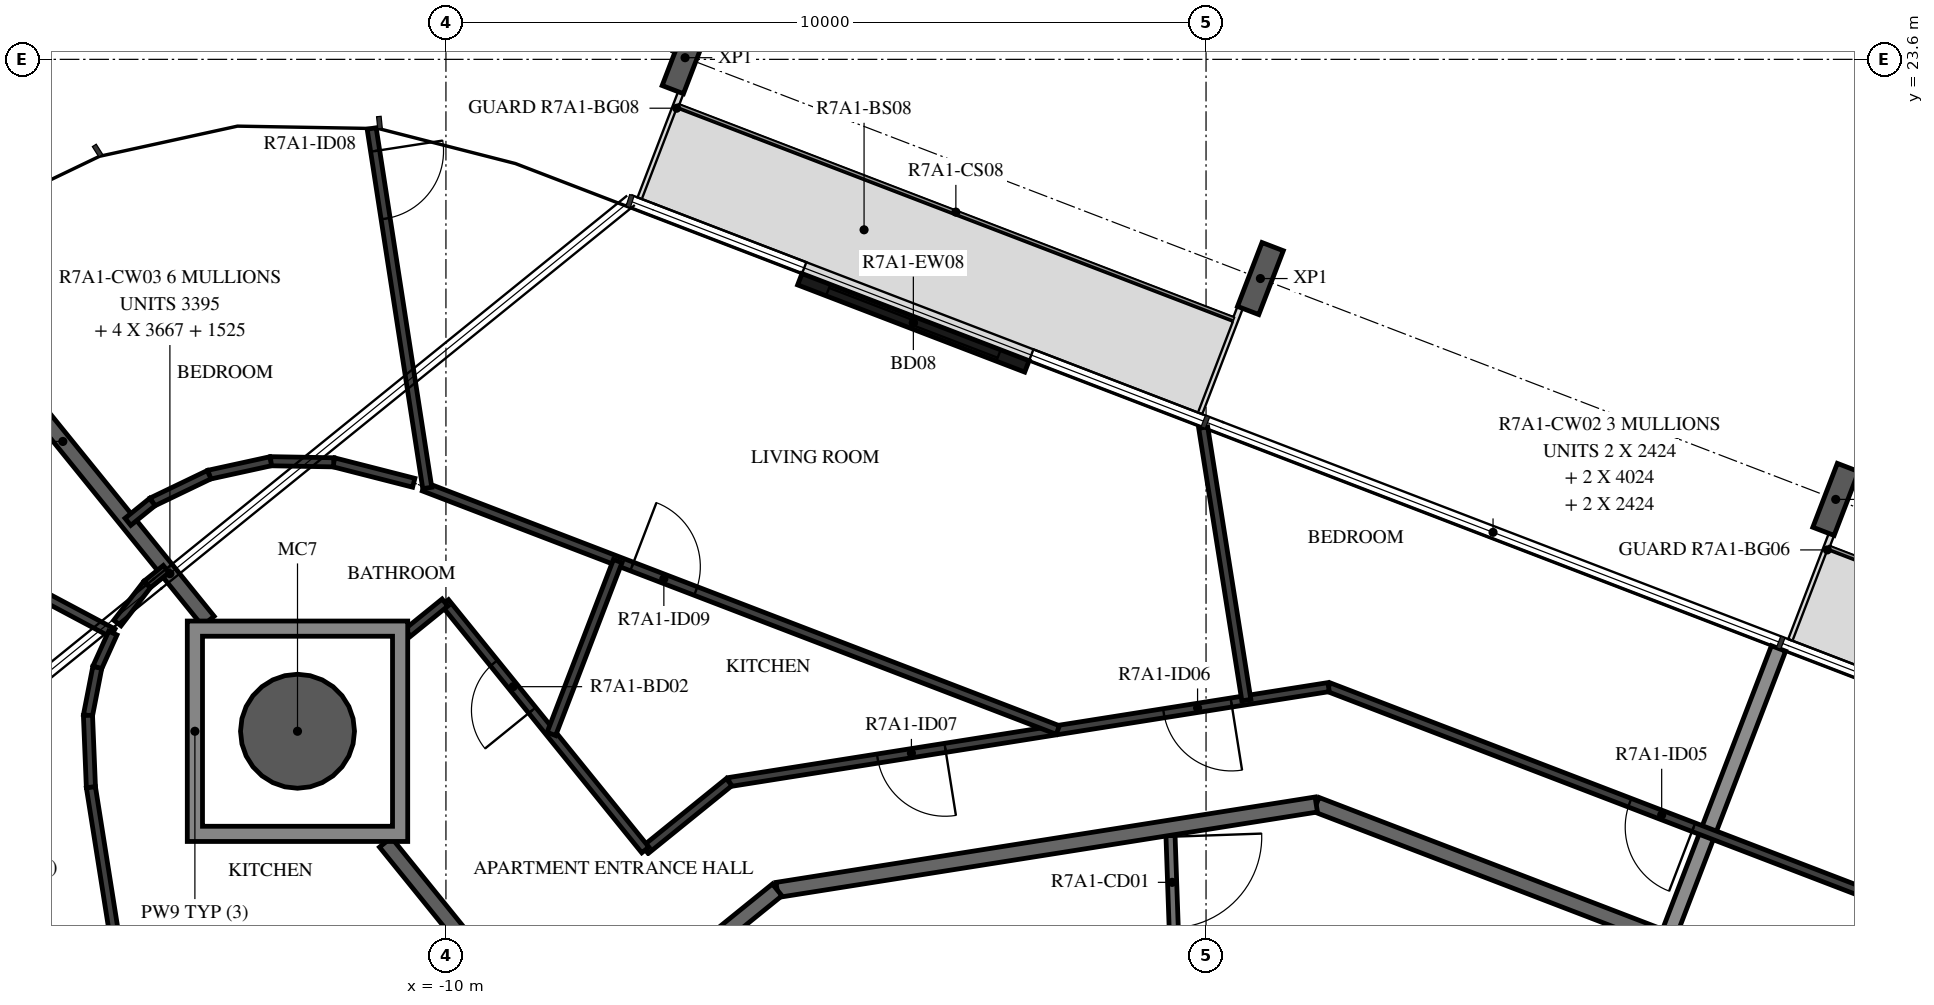
"""IFC4 building model, lengths in metres.
Left out: names, types, materials, properties, quantities, classifications, styles, units other than length and angle.
Written with IfcOpenShell. Run it as: python <this file> out.ifc"""

import sys

from ifc_helpers import new_model, si_unit, direction, frame, frame_2d, origin, origin_2d, place, context, subcontext, project, spatial, polyline, rectangle, hollow_circle, i_section, outline, extrude, element, fill, save


model = new_model("IFC4")
c1 = context("Model", 3, precision=1e-05, world=origin(), true_north=direction((0.0, 1.0)))
c2 = subcontext(c1, "Body", "Model", "MODEL_VIEW")
j1 = project(units=[si_unit("LENGTHUNIT", "METRE"), si_unit("PLANEANGLEUNIT", "RADIAN")], contexts=[c1])
p1 = place(None, origin())
s1 = spatial("IfcSite", under=j1, at=p1, CompositionType="ELEMENT")
p2 = place(p1, origin())
s2 = spatial("IfcBuilding", under=s1, at=p2, CompositionType="ELEMENT")
p3 = place(p2, frame((0.0, 0.0, 266.9)))
s3 = spatial("IfcBuildingStorey", under=s2, at=p3, CompositionType="ELEMENT", Elevation=266.9)
p4 = place(p3, frame((-11.953, 14.76, -0.38), z_axis=(0.0, 0.0, 1.0), x_axis=(1.0, 0.0, 0.0)))
e1 = element("IfcColumn", 1, at=p4, inside=s3, PredefinedType="COLUMN", context=c2, shape_type="SweptSolid", body=[
    extrude(hollow_circle(Radius=0.75, WallThickness=0.035, at=origin_2d()), origin(), (0.0, 0.0, 1.0), 3.5),
])
for number, where, z_axis, x_axis in (
    (2, (8.284, 17.811, -0.38), (0.0, 0.0, 1.0), (0.934, -0.358, 0.0)),
    (3, (0.715, 20.716, -0.38), (0.0, 0.0, 1.0), (0.934, -0.358, 0.0)),
    (4, (-6.854, 23.622, -0.38), (0.0, 0.0, 1.0), (0.934, -0.358, 0.0)),
):
    element("IfcColumn", number, at=place(p3, frame(where, z_axis=z_axis, x_axis=x_axis)), inside=s3, PredefinedType="COLUMN", context=c2, shape_type="SweptSolid", body=[
        extrude(i_section(OverallWidth=0.3, OverallDepth=0.9, WebThickness=0.019, FlangeThickness=0.035, FilletRadius=0.03, at=origin_2d()), origin(), (0.0, 0.0, 1.0), 3.5),
    ])
p5 = place(p3, frame((-2.357, 19.56, 0.0), z_axis=(0.0, 0.0, 1.0), x_axis=(-0.933553885508, 0.358437083534, 0.0)))
e5 = element("IfcWall", 5, at=p5, inside=s3, PredefinedType="STANDARD", context=c2, shape_type="SweptSolid", body=[
    extrude(rectangle(XDim=3.2, YDim=0.16, at=frame_2d((1.6, 0.0))), origin(), (0.0, 0.0, 1.0), 3.12),
])
p6 = place(p5, frame((0.4, 0.0, 0.0)))
e6 = element("IfcOpeningElement", 6, at=p6, cuts=e5, PredefinedType="OPENING", context=c2, shape_type="SweptSolid", body=[
    extrude(rectangle(XDim=2.4, YDim=2.4, at=frame_2d((1.2, 1.2))), frame((0.0, 0.09, 0.0), z_axis=(0.0, -1.0, 0.0), x_axis=(1.0, 0.0, 0.0)), (0.0, 0.0, 1.0), 0.18),
])
p7 = place(p3, frame((-0.471, 13.492, 0.0), z_axis=(0.0, 0.0, 1.0), x_axis=(0.034873173869, -0.999391745886, 0.0)))
e7 = element("IfcWall", 7, at=p7, inside=s3, PredefinedType="PARTITIONING", context=c2, shape_type="SweptSolid", body=[
    extrude(rectangle(XDim=1.596, YDim=0.12, at=frame_2d((0.798, 0.0))), origin(), (0.0, 0.0, 1.0), 3.12),
])
p8 = place(p7, frame((0.12, 0.0, 0.0)))
e8 = element("IfcOpeningElement", 8, at=p8, cuts=e7, PredefinedType="OPENING", context=c2, shape_type="SweptSolid", body=[
    extrude(rectangle(XDim=1.2, YDim=2.1, at=frame_2d((0.6, 1.05))), frame((0.0, 0.07, 0.0), z_axis=(0.0, -1.0, 0.0), x_axis=(1.0, 0.0, 0.0)), (0.0, 0.0, 1.0), 0.14),
])
p9 = place(p3, frame((8.154, 11.223, 0.0), z_axis=(0.0, 0.0, 1.0), x_axis=(-0.93359073609, 0.358341090983, 0.0)))
e9 = element("IfcWall", 9, at=p9, inside=s3, PredefinedType="STANDARD", context=c2, shape_type="SweptSolid", body=[
    extrude(rectangle(XDim=7.181, YDim=0.2, at=frame_2d((3.59, 0.0))), origin(), (0.0, 0.0, 1.0), 3.12),
])
p10 = place(p3, frame((1.45, 13.797, 0.0), z_axis=(0.0, 0.0, 1.0), x_axis=(-0.987690361611, -0.156421704315, 0.0)))
e10 = element("IfcWall", 10, at=p10, inside=s3, PredefinedType="STANDARD", context=c2, shape_type="SweptSolid", body=[
    extrude(rectangle(XDim=7.181, YDim=0.2, at=frame_2d((3.591, 0.0))), origin(), (0.0, 0.0, 1.0), 3.12),
])
p11 = place(p3, frame((-5.643, 12.673, 0.0), z_axis=(0.0, 0.0, 1.0), x_axis=(-0.777160148113, -0.629302871585, 0.0)))
e11 = element("IfcWall", 11, at=p11, inside=s3, PredefinedType="STANDARD", context=c2, shape_type="SweptSolid", body=[
    extrude(rectangle(XDim=7.181, YDim=0.2, at=frame_2d((3.59, 0.0))), origin(), (0.0, 0.0, 1.0), 3.12),
])
p12 = place(p11, frame((2.41, 0.0, 0.0)))
e12 = element("IfcOpeningElement", 12, at=p12, cuts=e11, PredefinedType="OPENING", context=c2, shape_type="SweptSolid", body=[
    extrude(rectangle(XDim=1.0, YDim=2.1, at=frame_2d((0.5, 1.05))), frame((0.0, 0.11, 0.0), z_axis=(0.0, -1.0, 0.0), x_axis=(1.0, 0.0, 0.0)), (0.0, 0.0, 1.0), 0.22),
])
p13 = place(p11, frame((5.112, 0.0, 0.0)))
e13 = element("IfcOpeningElement", 13, at=p13, cuts=e11, PredefinedType="OPENING", context=c2, shape_type="SweptSolid", body=[
    extrude(rectangle(XDim=1.0, YDim=2.1, at=frame_2d((0.5, 1.05))), frame((0.0, 0.11, 0.0), z_axis=(0.0, -1.0, 0.0), x_axis=(1.0, 0.0, 0.0)), (0.0, 0.0, 1.0), 0.22),
])
p14 = place(p3, frame((7.532, 15.85, 0.0), z_axis=(0.0, 0.0, 1.0), x_axis=(-0.358355996975, -0.933585014571, 0.0)))
e14 = element("IfcWall", 14, at=p14, inside=s3, PredefinedType="STANDARD", context=c2, shape_type="SweptSolid", body=[
    extrude(rectangle(XDim=4.096, YDim=0.2, at=frame_2d((2.048, 0.0))), origin(), (0.0, 0.0, 1.0), 2.73),
])
p15 = place(p3, frame((-10.796, 13.299, 0.0), z_axis=(0.0, 0.0, 1.0), x_axis=(0.629290499381, -0.777170166301, 0.0)))
e15 = element("IfcWall", 15, at=p15, inside=s3, PredefinedType="STANDARD", context=c2, shape_type="SweptSolid", body=[
    extrude(rectangle(XDim=3.729, YDim=0.2, at=frame_2d((1.865, 0.0))), origin(), (0.0, 0.0, 1.0), 3.12),
])
p16 = place(p3, frame((-16.953, 20.936, 0.0), z_axis=(0.0, 0.0, 1.0), x_axis=(0.629331057166, -0.777137324085, 0.0)))
e16 = element("IfcWall", 16, at=p16, inside=s3, PredefinedType="STANDARD", context=c2, shape_type="SweptSolid", body=[
    extrude(rectangle(XDim=6.08, YDim=0.2, at=frame_2d((3.04, 0.0))), origin(), (0.0, 0.0, 1.0), 3.12),
])
p17 = place(p3, frame((9.067, 12.479, 0.0), z_axis=(0.0, 0.0, 1.0), x_axis=(-0.933579449035, 0.358370495911, 0.0)))
e17 = element("IfcWall", 17, at=p17, inside=s3, PredefinedType="PARTITIONING", context=c2, shape_type="SweptSolid", body=[
    extrude(rectangle(XDim=7.985, YDim=0.12, at=frame_2d((3.992, 0.0))), origin(), (0.0, 0.0, 1.0), 3.12),
])
p18 = place(p17, frame((2.841, 0.0, 0.0)))
e18 = element("IfcOpeningElement", 18, at=p18, cuts=e17, PredefinedType="OPENING", context=c2, shape_type="SweptSolid", body=[
    extrude(rectangle(XDim=0.9, YDim=2.1, at=frame_2d((0.45, 1.05))), frame((0.0, 0.07, 0.0), z_axis=(0.0, -1.0, 0.0), x_axis=(1.0, 0.0, 0.0)), (0.0, 0.0, 1.0), 0.14),
])
p19 = place(p3, frame((1.612, 15.341, 0.0), z_axis=(0.0, 0.0, 1.0), x_axis=(-0.987689722749, -0.156425738216, 0.0)))
e19 = element("IfcWall", 19, at=p19, inside=s3, PredefinedType="PARTITIONING", context=c2, shape_type="SweptSolid", body=[
    extrude(rectangle(XDim=7.985, YDim=0.12, at=frame_2d((3.992, 0.0))), origin(), (0.0, 0.0, 1.0), 3.12),
])
p20 = place(p19, frame((1.295, 0.0, 0.0)))
e20 = element("IfcOpeningElement", 20, at=p20, cuts=e19, PredefinedType="OPENING", context=c2, shape_type="SweptSolid", body=[
    extrude(rectangle(XDim=0.9, YDim=2.1, at=frame_2d((0.45, 1.05))), frame((0.0, 0.07, 0.0), z_axis=(0.0, -1.0, 0.0), x_axis=(1.0, 0.0, 0.0)), (0.0, 0.0, 1.0), 0.14),
])
p21 = place(p19, frame((5.107, 0.0, 0.0)))
e21 = element("IfcOpeningElement", 21, at=p21, cuts=e19, PredefinedType="OPENING", context=c2, shape_type="SweptSolid", body=[
    extrude(rectangle(XDim=0.9, YDim=2.1, at=frame_2d((0.45, 1.05))), frame((0.0, 0.07, 0.0), z_axis=(0.0, -1.0, 0.0), x_axis=(1.0, 0.0, 0.0)), (0.0, 0.0, 1.0), 0.14),
])
p22 = place(p3, frame((-6.274, 14.092, 0.0), z_axis=(0.0, 0.0, 1.0), x_axis=(-0.777144673245, -0.629321981855, 0.0)))
e22 = element("IfcWall", 22, at=p22, inside=s3, PredefinedType="PARTITIONING", context=c2, shape_type="SweptSolid", body=[
    extrude(rectangle(XDim=1.419, YDim=0.12, at=frame_2d((0.709, 0.0))), origin(), (0.0, 0.0, 1.0), 3.12),
])
p23 = place(p3, frame((-7.377, 13.199, 0.0), z_axis=(0.0, 0.0, 1.0), x_axis=(-0.629382670352, 0.77709552454, 0.0)))
e23 = element("IfcWall", 23, at=p23, inside=s3, PredefinedType="PARTITIONING", context=c2, shape_type="SweptSolid", body=[
    extrude(rectangle(XDim=4.188, YDim=0.12, at=frame_2d((2.094, 0.0))), origin(), (0.0, 0.0, 1.0), 3.12),
])
p24 = place(p23, frame((2.364, 0.0, 0.0)))
e24 = element("IfcOpeningElement", 24, at=p24, cuts=e23, PredefinedType="OPENING", context=c2, shape_type="SweptSolid", body=[
    extrude(rectangle(XDim=0.8, YDim=2.1, at=frame_2d((0.4, 1.05))), frame((0.0, 0.07, 0.0), z_axis=(0.0, -1.0, 0.0), x_axis=(1.0, 0.0, 0.0)), (0.0, 0.0, 1.0), 0.14),
])
p25 = place(p3, frame((-10.013, 16.454, 0.0), z_axis=(0.0, 0.0, 1.0), x_axis=(-0.777001388062, -0.629498882406, 0.0)))
e25 = element("IfcWall", 25, at=p25, inside=s3, PredefinedType="PARTITIONING", context=c2, shape_type="SweptSolid", body=[
    extrude(rectangle(XDim=0.631, YDim=0.12, at=frame_2d((0.315, 0.0))), origin(), (0.0, 0.0, 1.0), 3.12),
])
p26 = place(p3, frame((-0.037, 18.756, 0.0), z_axis=(0.0, 0.0, 1.0), x_axis=(0.156421851095, -0.987690338365, 0.0)))
e26 = element("IfcWall", 26, at=p26, inside=s3, PredefinedType="PARTITIONING", context=c2, shape_type="SweptSolid", body=[
    extrude(rectangle(XDim=3.63, YDim=0.12, at=frame_2d((1.815, 0.0))), origin(), (0.0, 0.0, 1.0), 3.12),
])
p27 = place(p3, frame((-10.289, 17.978, 0.0), z_axis=(0.0, 0.0, 1.0), x_axis=(0.933579293595, -0.358370900844, 0.0)))
e27 = element("IfcWall", 27, at=p27, inside=s3, PredefinedType="PARTITIONING", context=c2, shape_type="SweptSolid", body=[
    extrude(rectangle(XDim=8.932, YDim=0.12, at=frame_2d((4.466, 0.0))), origin(), (0.0, 0.0, 1.0), 3.12),
])
p28 = place(p27, frame((2.93, 0.0, 0.0)))
e28 = element("IfcOpeningElement", 28, at=p28, cuts=e27, PredefinedType="OPENING", context=c2, shape_type="SweptSolid", body=[
    extrude(rectangle(XDim=0.9, YDim=2.1, at=frame_2d((0.45, 1.05))), frame((0.0, 0.07, 0.0), z_axis=(0.0, -1.0, 0.0), x_axis=(1.0, 0.0, 0.0)), (0.0, 0.0, 1.0), 0.14),
])
p29 = place(p3, frame((-10.977, 22.691, 0.0), z_axis=(0.0, 0.0, 1.0), x_axis=(0.152888983102, -0.988243370252, 0.0)))
e29 = element("IfcWall", 29, at=p29, inside=s3, PredefinedType="PARTITIONING", context=c2, shape_type="SweptSolid", body=[
    extrude(rectangle(XDim=4.786, YDim=0.12, at=frame_2d((2.393, 0.0))), origin(), (0.0, 0.0, 1.0), 3.12),
])
p30 = place(p29, frame((0.3, 0.0, 0.0)))
e30 = element("IfcOpeningElement", 30, at=p30, cuts=e29, PredefinedType="OPENING", context=c2, shape_type="SweptSolid", body=[
    extrude(rectangle(XDim=0.9, YDim=2.1, at=frame_2d((0.45, 1.05))), frame((0.0, 0.07, 0.0), z_axis=(0.0, -1.0, 0.0), x_axis=(1.0, 0.0, 0.0)), (0.0, 0.0, 1.0), 0.14),
])
p31 = place(p3, frame((-7.74, 17.0, 0.0), z_axis=(0.0, 0.0, 1.0), x_axis=(-0.358394723652, -0.93357014844, 0.0)))
e31 = element("IfcWall", 31, at=p31, inside=s3, PredefinedType="PARTITIONING", context=c2, shape_type="SweptSolid", body=[
    extrude(rectangle(XDim=2.436, YDim=0.12, at=frame_2d((1.218, 0.0))), origin(), (0.0, 0.0, 1.0), 3.12),
])
p32 = place(p3, frame((-10.424, 18.03, 0.0), z_axis=(0.0, 0.0, 1.0), x_axis=(-0.968874161395, 0.247553750489, 0.0)))
e32 = element("IfcWall", 32, at=p32, inside=s3, PredefinedType="PARTITIONING", context=c2, shape_type="SweptSolid", body=[
    extrude(rectangle(XDim=1.087, YDim=0.12, at=frame_2d((0.543, 0.0))), origin(), (0.0, 0.0, 1.0), 3.12),
])
p33 = place(p3, frame((-11.477, 18.299, 0.0), z_axis=(0.0, 0.0, 1.0), x_axis=(-0.999848939146, 0.017380992165, 0.0)))
e33 = element("IfcWall", 33, at=p33, inside=s3, PredefinedType="PARTITIONING", context=c2, shape_type="SweptSolid", body=[
    extrude(rectangle(XDim=0.829, YDim=0.12, at=frame_2d((0.415, 0.0))), origin(), (0.0, 0.0, 1.0), 3.12),
])
p34 = place(p3, frame((-12.305, 18.313, 0.0), z_axis=(0.0, 0.0, 1.0), x_axis=(-0.976949932909, -0.21346856581, 0.0)))
e34 = element("IfcWall", 34, at=p34, inside=s3, PredefinedType="PARTITIONING", context=c2, shape_type="SweptSolid", body=[
    extrude(rectangle(XDim=0.829, YDim=0.12, at=frame_2d((0.415, 0.0))), origin(), (0.0, 0.0, 1.0), 3.12),
])
p35 = place(p3, frame((-13.115, 18.136, 0.0), z_axis=(0.0, 0.0, 1.0), x_axis=(-0.901385111422, -0.43301833784, 0.0)))
e35 = element("IfcWall", 35, at=p35, inside=s3, PredefinedType="PARTITIONING", context=c2, shape_type="SweptSolid", body=[
    extrude(rectangle(XDim=0.829, YDim=0.12, at=frame_2d((0.415, 0.0))), origin(), (0.0, 0.0, 1.0), 3.12),
])
p36 = place(p3, frame((-13.862, 17.777, 0.0), z_axis=(0.0, 0.0, 1.0), x_axis=(-0.776888119785, -0.629638665694, 0.0)))
e36 = element("IfcWall", 36, at=p36, inside=s3, PredefinedType="PARTITIONING", context=c2, shape_type="SweptSolid", body=[
    extrude(rectangle(XDim=0.415, YDim=0.12, at=frame_2d((0.207, 0.0))), origin(), (0.0, 0.0, 1.0), 3.12),
])
p37 = place(p3, frame((-14.323, 16.184, 0.0), z_axis=(0.0, 0.0, 1.0), x_axis=(0.611198506308, 0.791477343887, 0.0)))
e37 = element("IfcWall", 37, at=p37, inside=s3, PredefinedType="PARTITIONING", context=c2, shape_type="SweptSolid", body=[
    extrude(rectangle(XDim=0.642, YDim=0.12, at=frame_2d((0.321, 0.0))), origin(), (0.0, 0.0, 1.0), 3.12),
])
p38 = place(p3, frame((-13.93, 16.692, 0.0), z_axis=(0.0, 0.0, 1.0), x_axis=(0.776695397137, 0.62987638475, 0.0)))
e38 = element("IfcWall", 38, at=p38, inside=s3, PredefinedType="PARTITIONING", context=c2, shape_type="SweptSolid", body=[
    extrude(rectangle(XDim=0.321, YDim=0.12, at=frame_2d((0.161, 0.0))), origin(), (0.0, 0.0, 1.0), 3.12),
])
p39 = place(p3, frame((-18.983, 18.499, 0.0), z_axis=(0.0, 0.0, 1.0), x_axis=(0.882948840489, -0.469469216328, 0.0)))
e39 = element("IfcWall", 39, at=p39, inside=s3, PredefinedType="PARTITIONING", context=c2, shape_type="SweptSolid", body=[
    extrude(rectangle(XDim=5.211, YDim=0.12, at=frame_2d((2.605, 0.0))), origin(), (0.0, 0.0, 1.0), 2.73),
])
p40 = place(p39, frame((0.2, 0.0, 0.0)))
e40 = element("IfcOpeningElement", 40, at=p40, cuts=e39, PredefinedType="OPENING", context=c2, shape_type="SweptSolid", body=[
    extrude(rectangle(XDim=0.8, YDim=2.1, at=frame_2d((0.4, 1.05))), frame((0.0, 0.07, 0.0), z_axis=(0.0, -1.0, 0.0), x_axis=(1.0, 0.0, 0.0)), (0.0, 0.0, 1.0), 0.14),
])
p41 = place(p3, frame((-14.382, 16.052, 0.0), z_axis=(0.0, 0.0, 1.0), x_axis=(-0.412099912529, -0.911138662385, 0.0)))
e41 = element("IfcWall", 41, at=p41, inside=s3, PredefinedType="PARTITIONING", context=c2, shape_type="SweptSolid", body=[
    extrude(rectangle(XDim=0.497, YDim=0.12, at=frame_2d((0.249, 0.0))), origin(), (0.0, 0.0, 1.0), 3.12),
])
p42 = place(p3, frame((-14.587, 15.6, 0.0), z_axis=(0.0, 0.0, 1.0), x_axis=(-0.190920556667, -0.98160549155, 0.0)))
e42 = element("IfcWall", 42, at=p42, inside=s3, PredefinedType="PARTITIONING", context=c2, shape_type="SweptSolid", body=[
    extrude(rectangle(XDim=0.642, YDim=0.12, at=frame_2d((0.321, 0.0))), origin(), (0.0, 0.0, 1.0), 3.12),
])
p43 = place(p3, frame((-14.709, 14.969, 0.0), z_axis=(0.0, 0.0, 1.0), x_axis=(0.040729848009, -0.999170195453, 0.0)))
e43 = element("IfcWall", 43, at=p43, inside=s3, PredefinedType="PARTITIONING", context=c2, shape_type="SweptSolid", body=[
    extrude(rectangle(XDim=0.947, YDim=0.12, at=frame_2d((0.474, 0.0))), origin(), (0.0, 0.0, 1.0), 3.12),
])
p44 = place(p3, frame((-14.671, 14.023, 0.0), z_axis=(0.0, 0.0, 1.0), x_axis=(0.156438190471, -0.987687750538, 0.0)))
e44 = element("IfcWall", 44, at=p44, inside=s3, PredefinedType="PARTITIONING", context=c2, shape_type="SweptSolid", body=[
    extrude(rectangle(XDim=7.644, YDim=0.12, at=frame_2d((3.822, 0.0))), origin(), (0.0, 0.0, 1.0), 3.12),
])
p45 = place(p44, frame((3.803, 0.0, 0.0)))
e45 = element("IfcOpeningElement", 45, at=p45, cuts=e44, PredefinedType="OPENING", context=c2, shape_type="SweptSolid", body=[
    extrude(rectangle(XDim=0.9, YDim=2.1, at=frame_2d((0.45, 1.05))), frame((0.0, 0.07, 0.0), z_axis=(0.0, -1.0, 0.0), x_axis=(1.0, 0.0, 0.0)), (0.0, 0.0, 1.0), 0.14),
])
p46 = place(p3, frame((-19.913, 15.451, 0.0), z_axis=(0.0, 0.0, 1.0), x_axis=(0.758623462992, -0.6515293097, 0.0)))
e46 = element("IfcWall", 46, at=p46, inside=s3, PredefinedType="PARTITIONING", context=c2, shape_type="SweptSolid", body=[
    extrude(rectangle(XDim=7.653, YDim=0.12, at=frame_2d((3.826, 0.0))), origin(), (0.0, 0.0, 1.0), 3.12),
])
p47 = place(p46, frame((0.7, 0.0, 0.0)))
e47 = element("IfcOpeningElement", 47, at=p47, cuts=e46, PredefinedType="OPENING", context=c2, shape_type="SweptSolid", body=[
    extrude(rectangle(XDim=0.9, YDim=2.1, at=frame_2d((0.45, 1.05))), frame((0.0, 0.07, 0.0), z_axis=(0.0, -1.0, 0.0), x_axis=(1.0, 0.0, 0.0)), (0.0, 0.0, 1.0), 0.14),
])
p48 = place(p3, origin())
e48 = element("IfcWall", 48, at=p48, inside=s3, PredefinedType="STANDARD", context=c2, shape_type="SweptSolid", body=[
    extrude(outline(polyline([(-10.503, 16.21), (-10.503, 13.311), (-13.403, 13.311), (-13.403, 16.21), (-10.503, 16.21)]), holes=[polyline([(-13.203, 13.51), (-10.703, 13.51), (-10.703, 16.01), (-13.203, 16.01), (-13.203, 13.51)])]), origin(), (0.0, 0.0, 1.0), 3.12),
])
p49 = place(p6, origin())
e49 = element("IfcDoor", 49, at=p49, inside=s3, OperationType="DOUBLE_DOOR_SLIDING", PredefinedType="DOOR", context=c2, shape_type="SweptSolid", body=[
    extrude(rectangle(XDim=2.4, YDim=2.4, at=frame_2d((1.2, 1.2))), frame((0.0, 0.025, 0.0), z_axis=(0.0, -1.0, 0.0), x_axis=(1.0, 0.0, 0.0)), (0.0, 0.0, 1.0), 0.05),
])
fill(e6, e49)
p50 = place(p18, origin())
e50 = element("IfcDoor", 50, at=p50, inside=s3, OperationType="SINGLE_SWING_LEFT", PredefinedType="DOOR", context=c2, shape_type="SweptSolid", body=[
    extrude(rectangle(XDim=0.9, YDim=2.1, at=frame_2d((0.45, 1.05))), frame((0.0, 0.025, 0.0), z_axis=(0.0, -1.0, 0.0), x_axis=(1.0, 0.0, 0.0)), (0.0, 0.0, 1.0), 0.05),
])
fill(e18, e50)
p51 = place(p20, origin())
e51 = element("IfcDoor", 51, at=p51, inside=s3, OperationType="SINGLE_SWING_RIGHT", PredefinedType="DOOR", context=c2, shape_type="SweptSolid", body=[
    extrude(rectangle(XDim=0.9, YDim=2.1, at=frame_2d((0.45, 1.05))), frame((0.0, 0.025, 0.0), z_axis=(0.0, -1.0, 0.0), x_axis=(1.0, 0.0, 0.0)), (0.0, 0.0, 1.0), 0.05),
])
fill(e20, e51)
p52 = place(p21, origin())
e52 = element("IfcDoor", 52, at=p52, inside=s3, OperationType="SINGLE_SWING_RIGHT", PredefinedType="DOOR", context=c2, shape_type="SweptSolid", body=[
    extrude(rectangle(XDim=0.9, YDim=2.1, at=frame_2d((0.45, 1.05))), frame((0.0, 0.025, 0.0), z_axis=(0.0, -1.0, 0.0), x_axis=(1.0, 0.0, 0.0)), (0.0, 0.0, 1.0), 0.05),
])
fill(e21, e52)
p53 = place(p24, origin())
e53 = element("IfcDoor", 53, at=p53, inside=s3, OperationType="SINGLE_SWING_RIGHT", PredefinedType="DOOR", context=c2, shape_type="SweptSolid", body=[
    extrude(rectangle(XDim=0.8, YDim=2.1, at=frame_2d((0.4, 1.05))), frame((0.0, 0.025, 0.0), z_axis=(0.0, -1.0, 0.0), x_axis=(1.0, 0.0, 0.0)), (0.0, 0.0, 1.0), 0.05),
])
fill(e24, e53)
p54 = place(p30, origin())
e54 = element("IfcDoor", 54, at=p54, inside=s3, OperationType="SINGLE_SWING_RIGHT", PredefinedType="DOOR", context=c2, shape_type="SweptSolid", body=[
    extrude(rectangle(XDim=0.9, YDim=2.1, at=frame_2d((0.45, 1.05))), frame((0.0, 0.025, 0.0), z_axis=(0.0, -1.0, 0.0), x_axis=(1.0, 0.0, 0.0)), (0.0, 0.0, 1.0), 0.05),
])
fill(e30, e54)
p55 = place(p28, origin())
e55 = element("IfcDoor", 55, at=p55, inside=s3, OperationType="SINGLE_SWING_LEFT", PredefinedType="DOOR", context=c2, shape_type="SweptSolid", body=[
    extrude(rectangle(XDim=0.9, YDim=2.1, at=frame_2d((0.45, 1.05))), frame((0.0, 0.025, 0.0), z_axis=(0.0, -1.0, 0.0), x_axis=(1.0, 0.0, 0.0)), (0.0, 0.0, 1.0), 0.05),
])
fill(e28, e55)
p56 = place(p8, origin())
e56 = element("IfcDoor", 56, at=p56, inside=s3, OperationType="DOUBLE_DOOR_SINGLE_SWING", PredefinedType="DOOR", context=c2, shape_type="SweptSolid", body=[
    extrude(rectangle(XDim=1.2, YDim=2.1, at=frame_2d((0.6, 1.05))), frame((0.0, 0.025, 0.0), z_axis=(0.0, -1.0, 0.0), x_axis=(1.0, 0.0, 0.0)), (0.0, 0.0, 1.0), 0.05),
])
fill(e8, e56)
save(model, sys.argv[1])
